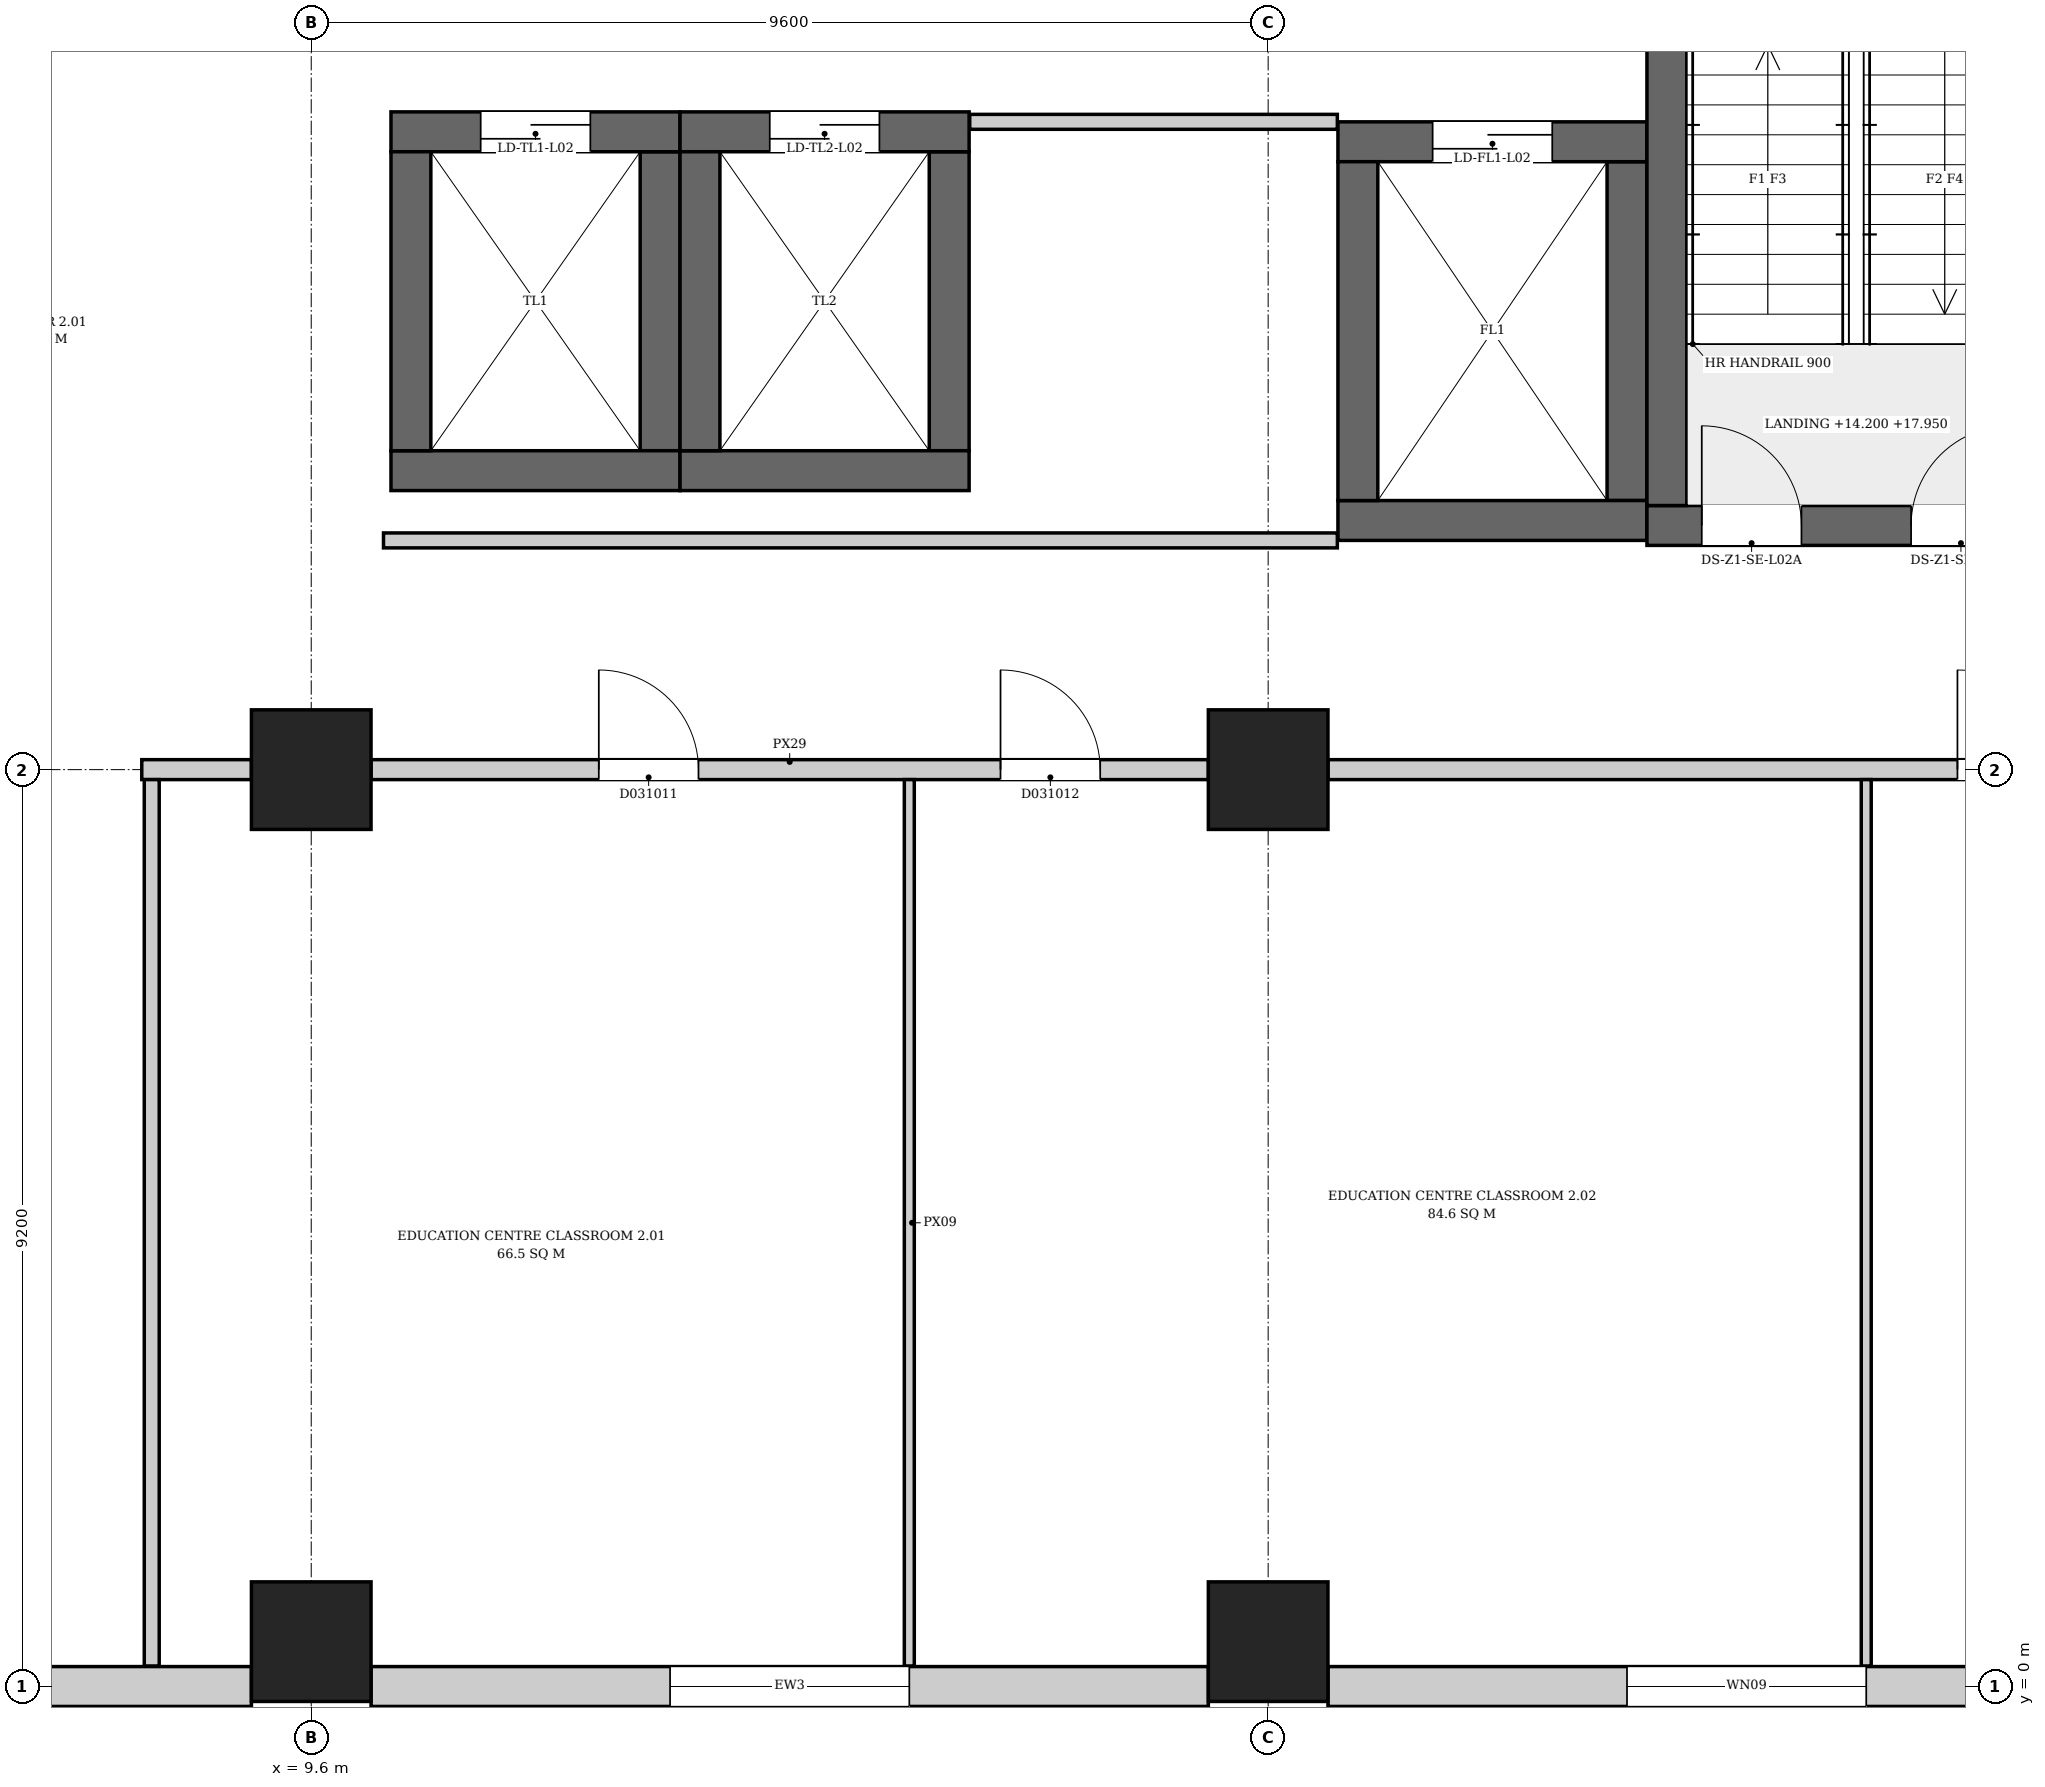
"""IFC4 building model, lengths in metres.
Left out: names, types, materials, properties, quantities, classifications, styles, units other than length and angle.
Written with IfcOpenShell. Run it as: python <this file> out.ifc"""

import sys

from ifc_helpers import new_model, si_unit, direction, frame, frame_2d, origin, origin_2d, place, context, subcontext, project, spatial, rectangle, extrude, element, fill, save


model = new_model("IFC4")
c1 = context("Model", 3, precision=1e-05, world=origin(), true_north=direction((0.0, 1.0)))
c2 = subcontext(c1, "Body", "Model", "MODEL_VIEW")
j1 = project(units=[si_unit("LENGTHUNIT", "METRE"), si_unit("PLANEANGLEUNIT", "RADIAN")], contexts=[c1])
p1 = place(None, origin())
s1 = spatial("IfcSite", under=j1, at=p1, CompositionType="ELEMENT")
p2 = place(p1, origin())
s2 = spatial("IfcBuilding", under=s1, at=p2, CompositionType="ELEMENT")
p3 = place(p2, frame((0.0, 0.0, 14.2)))
s3 = spatial("IfcBuildingStorey", under=s2, at=p3, CompositionType="ELEMENT", Elevation=14.2)
p4 = place(p3, frame((23.0, 11.65, 0.0), z_axis=(0.0, 0.0, 1.0), x_axis=(1.0, 0.0, 0.0)))
e1 = element("IfcWall", 1, at=p4, inside=s3, PredefinedType="SHEAR", context=c2, shape_type="SweptSolid", body=[
    extrude(rectangle(XDim=4.2, YDim=0.4, at=frame_2d((2.1, 0.0))), origin(), (0.0, 0.0, 1.0), 7.5),
])
p5 = place(p4, frame((0.55, 0.0, 0.0)))
e2 = element("IfcOpeningElement", 2, at=p5, cuts=e1, PredefinedType="OPENING", context=c2, shape_type="SweptSolid", body=[
    extrude(rectangle(XDim=1.0, YDim=2.1, at=frame_2d((0.5, 1.05))), frame((0.0, 0.21, 0.0), z_axis=(0.0, -1.0, 0.0), x_axis=(1.0, 0.0, 0.0)), (0.0, 0.0, 1.0), 0.42),
])
p6 = place(p4, frame((2.65, 0.0, 0.0)))
e3 = element("IfcOpeningElement", 3, at=p6, cuts=e1, PredefinedType="OPENING", context=c2, shape_type="SweptSolid", body=[
    extrude(rectangle(XDim=1.0, YDim=2.1, at=frame_2d((0.5, 1.05))), frame((0.0, 0.21, 0.0), z_axis=(0.0, -1.0, 0.0), x_axis=(1.0, 0.0, 0.0)), (0.0, 0.0, 1.0), 0.42),
])
p7 = place(p3, frame((23.2, 11.85, 0.0), z_axis=(0.0, 0.0, 1.0), x_axis=(0.0, 1.0, 0.0)))
e4 = element("IfcWall", 4, at=p7, inside=s3, PredefinedType="SHEAR", context=c2, shape_type="SweptSolid", body=[
    extrude(rectangle(XDim=6.6, YDim=0.4, at=frame_2d((3.3, 0.0))), origin(), (0.0, 0.0, 1.0), 7.5),
])
p8 = place(p3, frame((10.4, 12.2, 0.0), z_axis=(0.0, 0.0, 1.0), x_axis=(1.0, 0.0, 0.0)))
e5 = element("IfcWall", 5, at=p8, inside=s3, PredefinedType="SHEAR", context=c2, shape_type="SweptSolid", body=[
    extrude(rectangle(XDim=2.9, YDim=0.4, at=frame_2d((1.45, 0.0))), origin(), (0.0, 0.0, 1.0), 7.5),
])
p9 = place(p3, frame((10.4, 15.6, 0.0), z_axis=(0.0, 0.0, 1.0), x_axis=(1.0, 0.0, 0.0)))
e6 = element("IfcWall", 6, at=p9, inside=s3, PredefinedType="SHEAR", context=c2, shape_type="SweptSolid", body=[
    extrude(rectangle(XDim=2.9, YDim=0.4, at=frame_2d((1.45, 0.0))), origin(), (0.0, 0.0, 1.0), 7.5),
])
p10 = place(p9, frame((0.9, 0.0, 0.0)))
e7 = element("IfcOpeningElement", 7, at=p10, cuts=e6, PredefinedType="OPENING", context=c2, shape_type="SweptSolid", body=[
    extrude(rectangle(XDim=1.1, YDim=2.1, at=frame_2d((0.55, 1.05))), frame((0.0, 0.21, 0.0), z_axis=(0.0, -1.0, 0.0), x_axis=(1.0, 0.0, 0.0)), (0.0, 0.0, 1.0), 0.42),
])
for number, where, z_axis, x_axis in (
    (8, (10.6, 12.4, 0.0), (0.0, 0.0, 1.0), (0.0, 1.0, 0.0)),
    (9, (13.1, 12.4, 0.0), (0.0, 0.0, 1.0), (0.0, 1.0, 0.0)),
):
    element("IfcWall", number, at=place(p3, frame(where, z_axis=z_axis, x_axis=x_axis)), inside=s3, PredefinedType="SHEAR", context=c2, shape_type="SweptSolid", body=[
        extrude(rectangle(XDim=3.0, YDim=0.4, at=frame_2d((1.5, 0.0))), origin(), (0.0, 0.0, 1.0), 7.5),
    ])
p11 = place(p3, frame((13.3, 12.2, 0.0), z_axis=(0.0, 0.0, 1.0), x_axis=(1.0, 0.0, 0.0)))
e10 = element("IfcWall", 10, at=p11, inside=s3, PredefinedType="SHEAR", context=c2, shape_type="SweptSolid", body=[
    extrude(rectangle(XDim=2.9, YDim=0.4, at=frame_2d((1.45, 0.0))), origin(), (0.0, 0.0, 1.0), 7.5),
])
p12 = place(p3, frame((13.3, 15.6, 0.0), z_axis=(0.0, 0.0, 1.0), x_axis=(1.0, 0.0, 0.0)))
e11 = element("IfcWall", 11, at=p12, inside=s3, PredefinedType="SHEAR", context=c2, shape_type="SweptSolid", body=[
    extrude(rectangle(XDim=2.9, YDim=0.4, at=frame_2d((1.45, 0.0))), origin(), (0.0, 0.0, 1.0), 7.5),
])
p13 = place(p12, frame((0.9, 0.0, 0.0)))
e12 = element("IfcOpeningElement", 12, at=p13, cuts=e11, PredefinedType="OPENING", context=c2, shape_type="SweptSolid", body=[
    extrude(rectangle(XDim=1.1, YDim=2.1, at=frame_2d((0.55, 1.05))), frame((0.0, 0.21, 0.0), z_axis=(0.0, -1.0, 0.0), x_axis=(1.0, 0.0, 0.0)), (0.0, 0.0, 1.0), 0.42),
])
for number, where, z_axis, x_axis in (
    (13, (13.5, 12.4, 0.0), (0.0, 0.0, 1.0), (0.0, 1.0, 0.0)),
    (14, (16.0, 12.4, 0.0), (0.0, 0.0, 1.0), (0.0, 1.0, 0.0)),
):
    element("IfcWall", number, at=place(p3, frame(where, z_axis=z_axis, x_axis=x_axis)), inside=s3, PredefinedType="SHEAR", context=c2, shape_type="SweptSolid", body=[
        extrude(rectangle(XDim=3.0, YDim=0.4, at=frame_2d((1.5, 0.0))), origin(), (0.0, 0.0, 1.0), 7.5),
    ])
p14 = place(p3, frame((19.9, 11.7, 0.0), z_axis=(0.0, 0.0, 1.0), x_axis=(1.0, 0.0, 0.0)))
e15 = element("IfcWall", 15, at=p14, inside=s3, PredefinedType="SHEAR", context=c2, shape_type="SweptSolid", body=[
    extrude(rectangle(XDim=3.1, YDim=0.4, at=frame_2d((1.55, 0.0))), origin(), (0.0, 0.0, 1.0), 7.5),
])
p15 = place(p3, frame((19.9, 15.5, 0.0), z_axis=(0.0, 0.0, 1.0), x_axis=(1.0, 0.0, 0.0)))
e16 = element("IfcWall", 16, at=p15, inside=s3, PredefinedType="SHEAR", context=c2, shape_type="SweptSolid", body=[
    extrude(rectangle(XDim=3.1, YDim=0.4, at=frame_2d((1.55, 0.0))), origin(), (0.0, 0.0, 1.0), 7.5),
])
p16 = place(p15, frame((0.95, 0.0, 0.0)))
e17 = element("IfcOpeningElement", 17, at=p16, cuts=e16, PredefinedType="OPENING", context=c2, shape_type="SweptSolid", body=[
    extrude(rectangle(XDim=1.2, YDim=2.1, at=frame_2d((0.6, 1.05))), frame((0.0, 0.21, 0.0), z_axis=(0.0, -1.0, 0.0), x_axis=(1.0, 0.0, 0.0)), (0.0, 0.0, 1.0), 0.42),
])
for number, where, z_axis, x_axis in (
    (18, (20.1, 11.9, 0.0), (0.0, 0.0, 1.0), (0.0, 1.0, 0.0)),
    (19, (22.8, 11.9, 0.0), (0.0, 0.0, 1.0), (0.0, 1.0, 0.0)),
):
    element("IfcWall", number, at=place(p3, frame(where, z_axis=z_axis, x_axis=x_axis)), inside=s3, PredefinedType="SHEAR", context=c2, shape_type="SweptSolid", body=[
        extrude(rectangle(XDim=3.4, YDim=0.4, at=frame_2d((1.7, 0.0))), origin(), (0.0, 0.0, 1.0), 7.5),
    ])
for number, where, z_axis, x_axis in (
    (20, (9.6, 0.45, 0.0), (0.0, 0.0, 1.0), (1.0, 0.0, 0.0)),
    (21, (19.2, 0.45, 0.0), (0.0, 0.0, 1.0), (1.0, 0.0, 0.0)),
    (22, (9.6, 9.2, 0.0), (0.0, 0.0, 1.0), (1.0, 0.0, 0.0)),
    (23, (19.2, 9.2, 0.0), (0.0, 0.0, 1.0), (1.0, 0.0, 0.0)),
):
    element("IfcColumn", number, at=place(p3, frame(where, z_axis=z_axis, x_axis=x_axis)), inside=s3, PredefinedType="COLUMN", context=c2, shape_type="SweptSolid", body=[
        extrude(rectangle(XDim=1.2, YDim=1.2, at=origin_2d()), origin(), (0.0, 0.0, 1.0), 7.5),
    ])
p17 = place(p3, frame((0.2, 0.0, 0.0), z_axis=(0.0, 0.0, 1.0), x_axis=(1.0, 0.0, 0.0)))
e24 = element("IfcWall", 24, at=p17, inside=s3, PredefinedType="ELEMENTEDWALL", context=c2, shape_type="SweptSolid", body=[
    extrude(rectangle(XDim=8.8, YDim=0.4, at=frame_2d((4.4, 0.0))), origin(), (0.0, 0.0, 1.0), 7.15),
])
p18 = place(p17, frame((3.4, 0.0, 1.0)))
e25 = element("IfcOpeningElement", 25, at=p18, cuts=e24, PredefinedType="OPENING", context=c2, shape_type="SweptSolid", body=[
    extrude(rectangle(XDim=2.4, YDim=2.2, at=frame_2d((1.2, 1.1))), frame((0.0, 0.21, 0.0), z_axis=(0.0, -1.0, 0.0), x_axis=(1.0, 0.0, 0.0)), (0.0, 0.0, 1.0), 0.42),
])
p19 = place(p3, frame((10.2, 0.0, 0.0), z_axis=(0.0, 0.0, 1.0), x_axis=(1.0, 0.0, 0.0)))
e26 = element("IfcWall", 26, at=p19, inside=s3, PredefinedType="ELEMENTEDWALL", context=c2, shape_type="SweptSolid", body=[
    extrude(rectangle(XDim=8.4, YDim=0.4, at=frame_2d((4.2, 0.0))), origin(), (0.0, 0.0, 1.0), 7.15),
])
p20 = place(p19, frame((3.0, 0.0, 1.0)))
e27 = element("IfcOpeningElement", 27, at=p20, cuts=e26, PredefinedType="OPENING", context=c2, shape_type="SweptSolid", body=[
    extrude(rectangle(XDim=2.4, YDim=2.2, at=frame_2d((1.2, 1.1))), frame((0.0, 0.21, 0.0), z_axis=(0.0, -1.0, 0.0), x_axis=(1.0, 0.0, 0.0)), (0.0, 0.0, 1.0), 0.42),
])
p21 = place(p3, frame((19.8, 0.0, 0.0), z_axis=(0.0, 0.0, 1.0), x_axis=(1.0, 0.0, 0.0)))
e28 = element("IfcWall", 28, at=p21, inside=s3, PredefinedType="ELEMENTEDWALL", context=c2, shape_type="SweptSolid", body=[
    extrude(rectangle(XDim=8.4, YDim=0.4, at=frame_2d((4.2, 0.0))), origin(), (0.0, 0.0, 1.0), 7.15),
])
p22 = place(p21, frame((3.0, 0.0, 1.0)))
e29 = element("IfcOpeningElement", 29, at=p22, cuts=e28, PredefinedType="OPENING", context=c2, shape_type="SweptSolid", body=[
    extrude(rectangle(XDim=2.4, YDim=2.2, at=frame_2d((1.2, 1.1))), frame((0.0, 0.21, 0.0), z_axis=(0.0, -1.0, 0.0), x_axis=(1.0, 0.0, 0.0)), (0.0, 0.0, 1.0), 0.42),
])
p23 = place(p3, frame((7.9, 9.2, 0.0), z_axis=(0.0, 0.0, 1.0), x_axis=(1.0, 0.0, 0.0)))
e30 = element("IfcWall", 30, at=p23, inside=s3, PredefinedType="PARTITIONING", context=c2, shape_type="SweptSolid", body=[
    extrude(rectangle(XDim=1.1, YDim=0.2, at=frame_2d((0.55, 0.0))), origin(), (0.0, 0.0, 1.0), 6.75),
])
p24 = place(p3, frame((8.0, 0.206, 0.0), z_axis=(0.0, 0.0, 1.0), x_axis=(0.0, 1.0, 0.0)))
e31 = element("IfcWall", 31, at=p24, inside=s3, PredefinedType="PARTITIONING", context=c2, shape_type="SweptSolid", body=[
    extrude(rectangle(XDim=8.894, YDim=0.15, at=frame_2d((4.447, 0.0))), origin(), (0.0, 0.0, 1.0), 7.15),
])
p25 = place(p3, frame((10.2, 9.2, 0.0), z_axis=(0.0, 0.0, 1.0), x_axis=(1.0, 0.0, 0.0)))
e32 = element("IfcWall", 32, at=p25, inside=s3, PredefinedType="PARTITIONING", context=c2, shape_type="SweptSolid", body=[
    extrude(rectangle(XDim=8.4, YDim=0.2, at=frame_2d((4.2, 0.0))), origin(), (0.0, 0.0, 1.0), 6.75),
])
p26 = place(p25, frame((2.285, 0.0, 0.0)))
e33 = element("IfcOpeningElement", 33, at=p26, cuts=e32, PredefinedType="OPENING", context=c2, shape_type="SweptSolid", body=[
    extrude(rectangle(XDim=1.0, YDim=2.1, at=frame_2d((0.5, 1.05))), frame((0.0, 0.11, 0.0), z_axis=(0.0, -1.0, 0.0), x_axis=(1.0, 0.0, 0.0)), (0.0, 0.0, 1.0), 0.22),
])
p27 = place(p25, frame((6.315, 0.0, 0.0)))
e34 = element("IfcOpeningElement", 34, at=p27, cuts=e32, PredefinedType="OPENING", context=c2, shape_type="SweptSolid", body=[
    extrude(rectangle(XDim=1.0, YDim=2.1, at=frame_2d((0.5, 1.05))), frame((0.0, 0.11, 0.0), z_axis=(0.0, -1.0, 0.0), x_axis=(1.0, 0.0, 0.0)), (0.0, 0.0, 1.0), 0.22),
])
p28 = place(p3, frame((10.325, 11.5, 0.0), z_axis=(0.0, 0.0, 1.0), x_axis=(1.0, 0.0, 0.0)))
e35 = element("IfcWall", 35, at=p28, inside=s3, PredefinedType="PARTITIONING", context=c2, shape_type="SweptSolid", body=[
    extrude(rectangle(XDim=9.569, YDim=0.15, at=frame_2d((4.785, 0.0))), origin(), (0.0, 0.0, 1.0), 7.15),
])
p29 = place(p3, frame((15.6, 0.206, 0.0), z_axis=(0.0, 0.0, 1.0), x_axis=(0.0, 1.0, 0.0)))
e36 = element("IfcWall", 36, at=p29, inside=s3, PredefinedType="PARTITIONING", context=c2, shape_type="SweptSolid", body=[
    extrude(rectangle(XDim=8.894, YDim=0.1, at=frame_2d((4.447, 0.0))), origin(), (0.0, 0.0, 1.0), 7.15),
])
p30 = place(p3, frame((16.206, 15.7, 0.0), z_axis=(0.0, 0.0, 1.0), x_axis=(1.0, 0.0, 0.0)))
e37 = element("IfcWall", 37, at=p30, inside=s3, PredefinedType="PARTITIONING", context=c2, shape_type="SweptSolid", body=[
    extrude(rectangle(XDim=3.688, YDim=0.15, at=frame_2d((1.844, 0.0))), origin(), (0.0, 0.0, 1.0), 7.15),
])
p31 = place(p3, frame((19.8, 9.2, 0.0), z_axis=(0.0, 0.0, 1.0), x_axis=(1.0, 0.0, 0.0)))
e38 = element("IfcWall", 38, at=p31, inside=s3, PredefinedType="PARTITIONING", context=c2, shape_type="SweptSolid", body=[
    extrude(rectangle(XDim=8.4, YDim=0.2, at=frame_2d((4.2, 0.0))), origin(), (0.0, 0.0, 1.0), 6.75),
])
p32 = place(p31, frame((6.315, 0.0, 0.0)))
e39 = element("IfcOpeningElement", 39, at=p32, cuts=e38, PredefinedType="OPENING", context=c2, shape_type="SweptSolid", body=[
    extrude(rectangle(XDim=1.0, YDim=2.1, at=frame_2d((0.5, 1.05))), frame((0.0, 0.11, 0.0), z_axis=(0.0, -1.0, 0.0), x_axis=(1.0, 0.0, 0.0)), (0.0, 0.0, 1.0), 0.22),
])
p33 = place(p3, frame((25.2, 0.206, 0.0), z_axis=(0.0, 0.0, 1.0), x_axis=(0.0, 1.0, 0.0)))
e40 = element("IfcWall", 40, at=p33, inside=s3, PredefinedType="PARTITIONING", context=c2, shape_type="SweptSolid", body=[
    extrude(rectangle(XDim=8.894, YDim=0.1, at=frame_2d((4.447, 0.0))), origin(), (0.0, 0.0, 1.0), 7.15),
])
p34 = place(p20, origin())
e41 = element("IfcWindow", 41, at=p34, inside=s3, PartitioningType="SINGLE_PANEL", PredefinedType="WINDOW", context=c2, shape_type="SweptSolid", body=[
    extrude(rectangle(XDim=2.4, YDim=2.2, at=frame_2d((1.2, 1.1))), frame((0.0, 0.03, 0.0), z_axis=(0.0, -1.0, 0.0), x_axis=(1.0, 0.0, 0.0)), (0.0, 0.0, 1.0), 0.06),
])
fill(e27, e41)
p35 = place(p22, origin())
e42 = element("IfcWindow", 42, at=p35, inside=s3, PartitioningType="SINGLE_PANEL", PredefinedType="WINDOW", context=c2, shape_type="SweptSolid", body=[
    extrude(rectangle(XDim=2.4, YDim=2.2, at=frame_2d((1.2, 1.1))), frame((0.0, 0.03, 0.0), z_axis=(0.0, -1.0, 0.0), x_axis=(1.0, 0.0, 0.0)), (0.0, 0.0, 1.0), 0.06),
])
fill(e29, e42)
p36 = place(p5, origin())
e43 = element("IfcDoor", 43, at=p36, inside=s3, OperationType="SINGLE_SWING_RIGHT", PredefinedType="DOOR", context=c2, shape_type="SweptSolid", body=[
    extrude(rectangle(XDim=1.0, YDim=2.1, at=frame_2d((0.5, 1.05))), frame((0.0, 0.025, 0.0), z_axis=(0.0, -1.0, 0.0), x_axis=(1.0, 0.0, 0.0)), (0.0, 0.0, 1.0), 0.05),
])
fill(e2, e43)
p37 = place(p6, origin())
e44 = element("IfcDoor", 44, at=p37, inside=s3, OperationType="SINGLE_SWING_LEFT", PredefinedType="DOOR", context=c2, shape_type="SweptSolid", body=[
    extrude(rectangle(XDim=1.0, YDim=2.1, at=frame_2d((0.5, 1.05))), frame((0.0, 0.025, 0.0), z_axis=(0.0, -1.0, 0.0), x_axis=(1.0, 0.0, 0.0)), (0.0, 0.0, 1.0), 0.05),
])
fill(e3, e44)
p38 = place(p10, origin())
e45 = element("IfcDoor", 45, at=p38, inside=s3, OperationType="DOUBLE_DOOR_SLIDING", PredefinedType="DOOR", context=c2, shape_type="SweptSolid", body=[
    extrude(rectangle(XDim=1.1, YDim=2.1, at=frame_2d((0.55, 1.05))), frame((0.0, 0.025, 0.0), z_axis=(0.0, -1.0, 0.0), x_axis=(1.0, 0.0, 0.0)), (0.0, 0.0, 1.0), 0.05),
])
fill(e7, e45)
p39 = place(p13, origin())
e46 = element("IfcDoor", 46, at=p39, inside=s3, OperationType="DOUBLE_DOOR_SLIDING", PredefinedType="DOOR", context=c2, shape_type="SweptSolid", body=[
    extrude(rectangle(XDim=1.1, YDim=2.1, at=frame_2d((0.55, 1.05))), frame((0.0, 0.025, 0.0), z_axis=(0.0, -1.0, 0.0), x_axis=(1.0, 0.0, 0.0)), (0.0, 0.0, 1.0), 0.05),
])
fill(e12, e46)
p40 = place(p16, origin())
e47 = element("IfcDoor", 47, at=p40, inside=s3, OperationType="DOUBLE_DOOR_SLIDING", PredefinedType="DOOR", context=c2, shape_type="SweptSolid", body=[
    extrude(rectangle(XDim=1.2, YDim=2.1, at=frame_2d((0.6, 1.05))), frame((0.0, 0.025, 0.0), z_axis=(0.0, -1.0, 0.0), x_axis=(1.0, 0.0, 0.0)), (0.0, 0.0, 1.0), 0.05),
])
fill(e17, e47)
p41 = place(p26, origin())
e48 = element("IfcDoor", 48, at=p41, inside=s3, OperationType="SINGLE_SWING_RIGHT", PredefinedType="DOOR", context=c2, shape_type="SweptSolid", body=[
    extrude(rectangle(XDim=1.0, YDim=2.1, at=frame_2d((0.5, 1.05))), frame((0.0, 0.025, 0.0), z_axis=(0.0, -1.0, 0.0), x_axis=(1.0, 0.0, 0.0)), (0.0, 0.0, 1.0), 0.05),
])
fill(e33, e48)
p42 = place(p27, origin())
e49 = element("IfcDoor", 49, at=p42, inside=s3, OperationType="SINGLE_SWING_LEFT", PredefinedType="DOOR", context=c2, shape_type="SweptSolid", body=[
    extrude(rectangle(XDim=1.0, YDim=2.1, at=frame_2d((0.5, 1.05))), frame((0.0, 0.025, 0.0), z_axis=(0.0, -1.0, 0.0), x_axis=(1.0, 0.0, 0.0)), (0.0, 0.0, 1.0), 0.05),
])
fill(e34, e49)
p43 = place(p32, origin())
e50 = element("IfcDoor", 50, at=p43, inside=s3, OperationType="SINGLE_SWING_LEFT", PredefinedType="DOOR", context=c2, shape_type="SweptSolid", body=[
    extrude(rectangle(XDim=1.0, YDim=2.1, at=frame_2d((0.5, 1.05))), frame((0.0, 0.025, 0.0), z_axis=(0.0, -1.0, 0.0), x_axis=(1.0, 0.0, 0.0)), (0.0, 0.0, 1.0), 0.05),
])
fill(e39, e50)
save(model, sys.argv[1])
